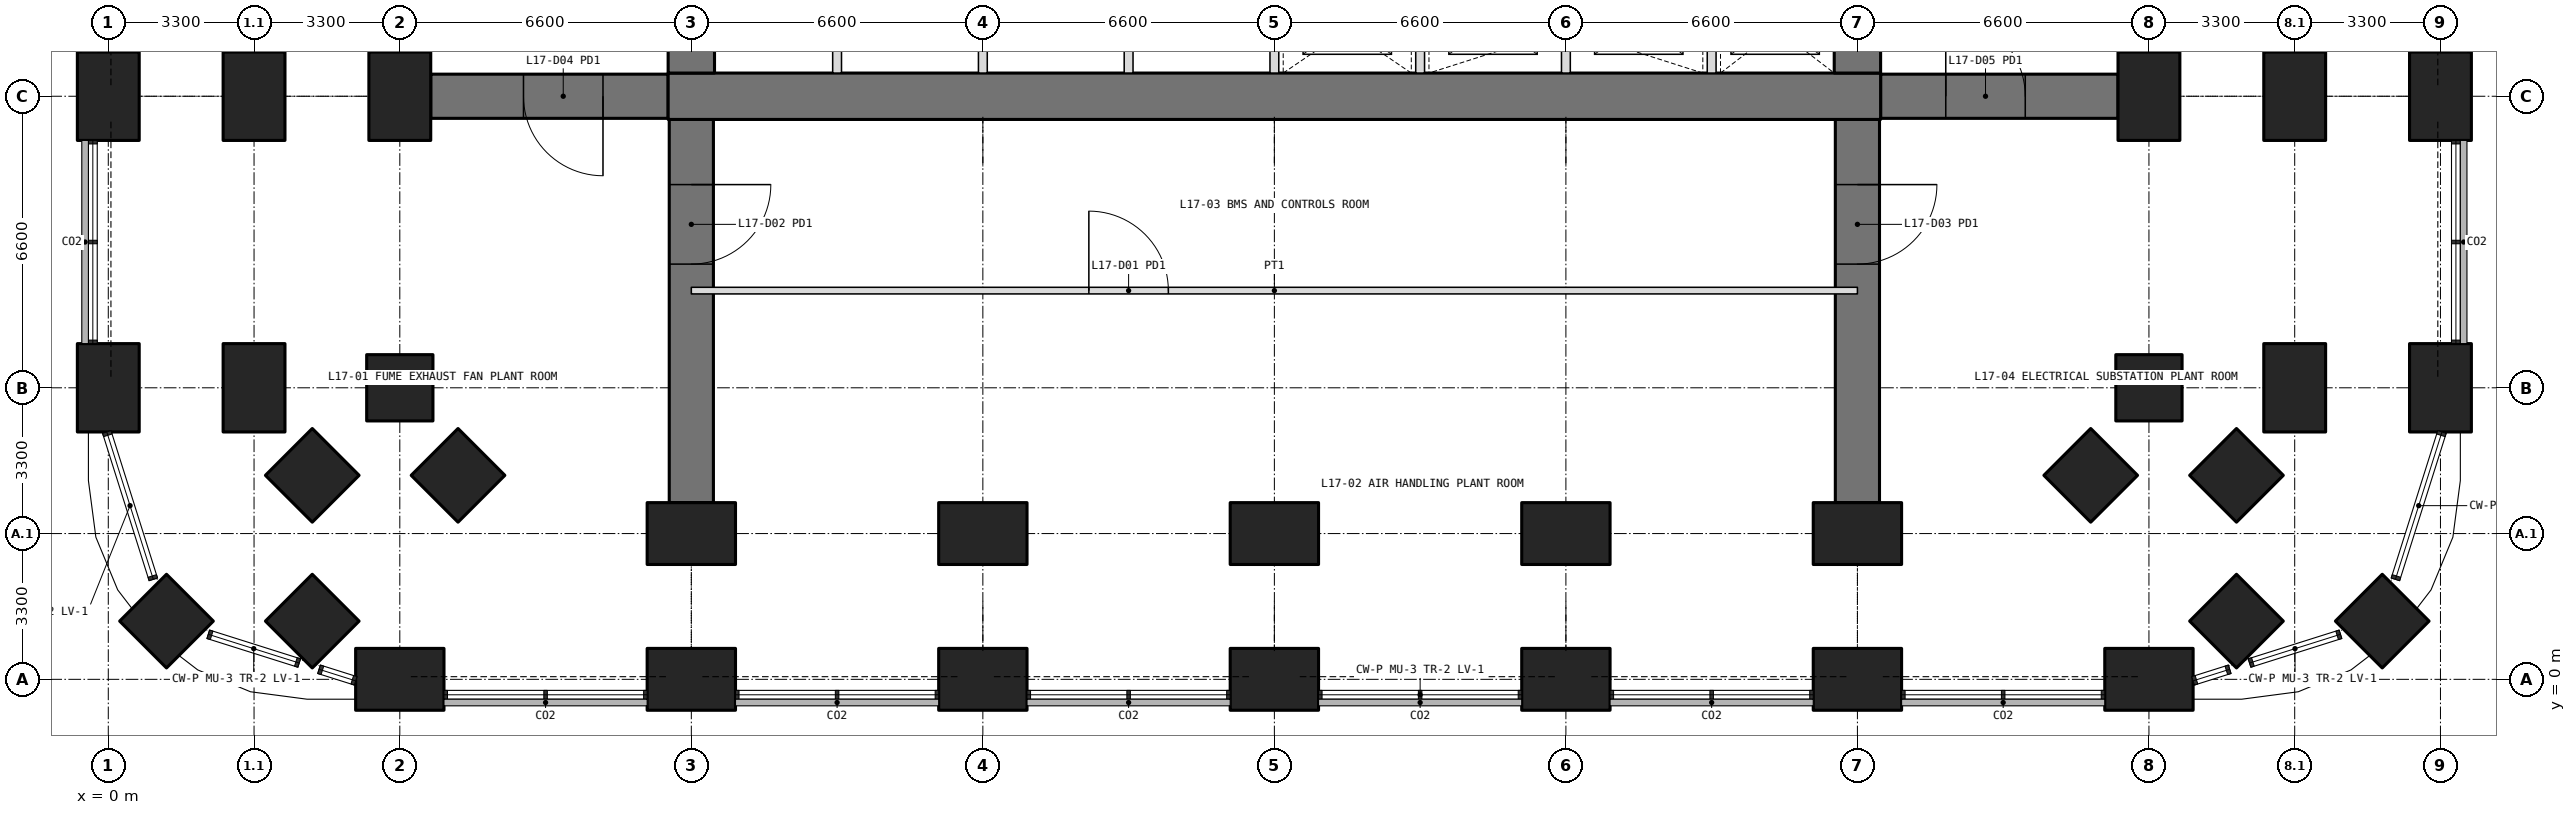
"""IFC4 building model, lengths in metres.
Left out: names, types, materials, properties, quantities, classifications, styles, units other than length and angle.
Written with IfcOpenShell. Run it as: python <this file> out.ifc"""

import sys

from ifc_helpers import new_model, si_unit, direction, frame, frame_2d, origin, origin_2d, place, context, subcontext, project, spatial, rectangle, extrude, element, fill, save


model = new_model("IFC4")
c1 = context("Model", 3, precision=1e-05, world=origin(), true_north=direction((0.0, 1.0)))
c2 = subcontext(c1, "Body", "Model", "MODEL_VIEW")
j1 = project(units=[si_unit("LENGTHUNIT", "METRE"), si_unit("PLANEANGLEUNIT", "RADIAN")], contexts=[c1])
p1 = place(None, origin())
s1 = spatial("IfcSite", under=j1, at=p1, CompositionType="ELEMENT")
p2 = place(p1, origin())
s2 = spatial("IfcBuilding", under=s1, at=p2, CompositionType="ELEMENT")
p3 = place(p2, frame((0.0, 0.0, 75.9)))
s3 = spatial("IfcBuildingStorey", under=s2, at=p3, CompositionType="ELEMENT", Elevation=75.9)
for number, where, z_axis, x_axis in (
    (1, (1.318, 1.318, 0.0), (0.0, 0.0, 1.0), (0.707, 0.707, 0.0)),
    (2, (51.482, 1.318, 0.0), (0.0, 0.0, 1.0), (0.707, 0.707, 0.0)),
):
    element("IfcColumn", number, at=place(p3, frame(where, z_axis=z_axis, x_axis=x_axis)), inside=s3, PredefinedType="COLUMN", context=c2, shape_type="SweptSolid", body=[
        extrude(rectangle(XDim=1.5, YDim=1.5, at=origin_2d()), origin(), (0.0, 0.0, 1.0), 6.3),
    ])
for number, where, z_axis, x_axis in (
    (3, (6.6, 0.0, 0.0), (0.0, 0.0, 1.0), (1.0, 0.0, 0.0)),
    (4, (13.2, 0.0, 0.0), (0.0, 0.0, 1.0), (1.0, 0.0, 0.0)),
    (5, (19.8, 0.0, 0.0), (0.0, 0.0, 1.0), (1.0, 0.0, 0.0)),
    (6, (26.4, 0.0, 0.0), (0.0, 0.0, 1.0), (1.0, 0.0, 0.0)),
    (7, (33.0, 0.0, 0.0), (0.0, 0.0, 1.0), (1.0, 0.0, 0.0)),
    (8, (39.6, 0.0, 0.0), (0.0, 0.0, 1.0), (1.0, 0.0, 0.0)),
    (9, (46.2, 0.0, 0.0), (0.0, 0.0, 1.0), (1.0, 0.0, 0.0)),
    (10, (0.0, 6.6, 0.0), (0.0, 0.0, 1.0), (0.0, 1.0, 0.0)),
    (11, (52.8, 6.6, 0.0), (0.0, 0.0, 1.0), (0.0, 1.0, 0.0)),
    (12, (0.0, 13.2, 0.0), (0.0, 0.0, 1.0), (0.0, 1.0, 0.0)),
    (13, (52.8, 13.2, 0.0), (0.0, 0.0, 1.0), (0.0, 1.0, 0.0)),
):
    element("IfcColumn", number, at=place(p3, frame(where, z_axis=z_axis, x_axis=x_axis)), inside=s3, PredefinedType="COLUMN", context=c2, shape_type="SweptSolid", body=[
        extrude(rectangle(XDim=2.0, YDim=1.4, at=origin_2d()), origin(), (0.0, 0.0, 1.0), 6.3),
    ])
for number, where, z_axis, x_axis in (
    (14, (6.6, 6.6, 0.0), (0.0, 0.0, 1.0), (1.0, 0.0, 0.0)),
    (15, (46.2, 6.6, 0.0), (0.0, 0.0, 1.0), (1.0, 0.0, 0.0)),
    (16, (4.618, 1.318, 0.0), (0.0, 0.0, 1.0), (0.707, 0.707, 0.0)),
    (17, (48.182, 1.318, 0.0), (0.0, 0.0, 1.0), (0.707, 0.707, 0.0)),
):
    element("IfcColumn", number, at=place(p3, frame(where, z_axis=z_axis, x_axis=x_axis)), inside=s3, PredefinedType="COLUMN", context=c2, shape_type="SweptSolid", body=[
        extrude(rectangle(XDim=1.5, YDim=1.5, at=origin_2d()), origin(), (0.0, 0.0, 1.0), 6.3),
    ])
for number, where, z_axis, x_axis in (
    (18, (3.3, 6.6, 0.0), (0.0, 0.0, 1.0), (0.0, 1.0, 0.0)),
    (19, (49.5, 6.6, 0.0), (0.0, 0.0, 1.0), (0.0, 1.0, 0.0)),
    (20, (3.3, 13.2, 0.0), (0.0, 0.0, 1.0), (0.0, 1.0, 0.0)),
    (21, (49.5, 13.2, 0.0), (0.0, 0.0, 1.0), (0.0, 1.0, 0.0)),
):
    element("IfcColumn", number, at=place(p3, frame(where, z_axis=z_axis, x_axis=x_axis)), inside=s3, PredefinedType="COLUMN", context=c2, shape_type="SweptSolid", body=[
        extrude(rectangle(XDim=2.0, YDim=1.4, at=origin_2d()), origin(), (0.0, 0.0, 1.0), 6.3),
    ])
for number, where, z_axis, x_axis in (
    (22, (4.618, 4.618, 0.0), (0.0, 0.0, 1.0), (0.707, 0.707, 0.0)),
    (23, (48.182, 4.618, 0.0), (0.0, 0.0, 1.0), (0.707, 0.707, 0.0)),
):
    element("IfcColumn", number, at=place(p3, frame(where, z_axis=z_axis, x_axis=x_axis)), inside=s3, PredefinedType="COLUMN", context=c2, shape_type="SweptSolid", body=[
        extrude(rectangle(XDim=1.5, YDim=1.5, at=origin_2d()), origin(), (0.0, 0.0, 1.0), 6.3),
    ])
for number, where, z_axis, x_axis in (
    (24, (13.2, 3.3, 0.0), (0.0, 0.0, 1.0), (1.0, 0.0, 0.0)),
    (25, (19.8, 3.3, 0.0), (0.0, 0.0, 1.0), (1.0, 0.0, 0.0)),
    (26, (26.4, 3.3, 0.0), (0.0, 0.0, 1.0), (1.0, 0.0, 0.0)),
    (27, (33.0, 3.3, 0.0), (0.0, 0.0, 1.0), (1.0, 0.0, 0.0)),
    (28, (39.6, 3.3, 0.0), (0.0, 0.0, 1.0), (1.0, 0.0, 0.0)),
):
    element("IfcColumn", number, at=place(p3, frame(where, z_axis=z_axis, x_axis=x_axis)), inside=s3, PredefinedType="COLUMN", context=c2, shape_type="SweptSolid", body=[
        extrude(rectangle(XDim=2.0, YDim=1.4, at=origin_2d()), origin(), (0.0, 0.0, 1.0), 6.3),
    ])
for number, where, z_axis, x_axis in (
    (29, (7.918, 4.618, 0.0), (0.0, 0.0, 1.0), (0.707, 0.707, 0.0)),
    (30, (44.882, 4.618, 0.0), (0.0, 0.0, 1.0), (0.707, 0.707, 0.0)),
):
    element("IfcColumn", number, at=place(p3, frame(where, z_axis=z_axis, x_axis=x_axis)), inside=s3, PredefinedType="COLUMN", context=c2, shape_type="SweptSolid", body=[
        extrude(rectangle(XDim=1.5, YDim=1.5, at=origin_2d()), origin(), (0.0, 0.0, 1.0), 6.3),
    ])
for number, where, z_axis, x_axis in (
    (31, (6.6, 13.2, 0.0), (0.0, 0.0, 1.0), (0.0, 1.0, 0.0)),
    (32, (46.2, 13.2, 0.0), (0.0, 0.0, 1.0), (0.0, 1.0, 0.0)),
):
    element("IfcColumn", number, at=place(p3, frame(where, z_axis=z_axis, x_axis=x_axis)), inside=s3, PredefinedType="COLUMN", context=c2, shape_type="SweptSolid", body=[
        extrude(rectangle(XDim=2.0, YDim=1.4, at=origin_2d()), origin(), (0.0, 0.0, 1.0), 6.3),
    ])
p4 = place(p3, frame((13.2, 12.675, 0.0), z_axis=(0.0, 0.0, 1.0), x_axis=(0.0, -1.0, 0.0)))
e33 = element("IfcWall", 33, at=p4, inside=s3, PredefinedType="SHEAR", context=c2, shape_type="SweptSolid", body=[
    extrude(rectangle(XDim=8.675, YDim=1.0, at=frame_2d((4.337, 0.0))), origin(), (0.0, 0.0, 1.0), 6.0),
])
p5 = place(p4, frame((1.475, 0.0, 0.0)))
e34 = element("IfcOpeningElement", 34, at=p5, cuts=e33, PredefinedType="OPENING", context=c2, shape_type="SweptSolid", body=[
    extrude(rectangle(XDim=1.8, YDim=2.4, at=frame_2d((0.9, 1.2))), frame((0.0, 0.51, 0.0), z_axis=(0.0, -1.0, 0.0), x_axis=(1.0, 0.0, 0.0)), (0.0, 0.0, 1.0), 1.02),
])
p6 = place(p3, frame((39.6, 12.675, 0.0), z_axis=(0.0, 0.0, 1.0), x_axis=(0.0, -1.0, 0.0)))
e35 = element("IfcWall", 35, at=p6, inside=s3, PredefinedType="SHEAR", context=c2, shape_type="SweptSolid", body=[
    extrude(rectangle(XDim=8.675, YDim=1.0, at=frame_2d((4.337, 0.0))), origin(), (0.0, 0.0, 1.0), 6.0),
])
p7 = place(p6, frame((1.475, 0.0, 0.0)))
e36 = element("IfcOpeningElement", 36, at=p7, cuts=e35, PredefinedType="OPENING", context=c2, shape_type="SweptSolid", body=[
    extrude(rectangle(XDim=1.8, YDim=2.4, at=frame_2d((0.9, 1.2))), frame((0.0, 0.51, 0.0), z_axis=(0.0, -1.0, 0.0), x_axis=(1.0, 0.0, 0.0)), (0.0, 0.0, 1.0), 1.02),
])
p8 = place(p3, frame((12.675, 13.2, 0.0), z_axis=(0.0, 0.0, 1.0), x_axis=(-1.0, 0.0, 0.0)))
e37 = element("IfcWall", 37, at=p8, inside=s3, PredefinedType="SHEAR", context=c2, shape_type="SweptSolid", body=[
    extrude(rectangle(XDim=5.375, YDim=1.0, at=frame_2d((2.688, 0.0))), origin(), (0.0, 0.0, 1.0), 6.0),
])
p9 = place(p8, frame((1.475, 0.0, 0.0)))
e38 = element("IfcOpeningElement", 38, at=p9, cuts=e37, PredefinedType="OPENING", context=c2, shape_type="SweptSolid", body=[
    extrude(rectangle(XDim=1.8, YDim=2.4, at=frame_2d((0.9, 1.2))), frame((0.0, 0.51, 0.0), z_axis=(0.0, -1.0, 0.0), x_axis=(1.0, 0.0, 0.0)), (0.0, 0.0, 1.0), 1.02),
])
p10 = place(p3, frame((40.125, 13.2, 0.0), z_axis=(0.0, 0.0, 1.0), x_axis=(1.0, 0.0, 0.0)))
e39 = element("IfcWall", 39, at=p10, inside=s3, PredefinedType="SHEAR", context=c2, shape_type="SweptSolid", body=[
    extrude(rectangle(XDim=5.375, YDim=1.0, at=frame_2d((2.688, 0.0))), origin(), (0.0, 0.0, 1.0), 6.0),
])
p11 = place(p10, frame((1.475, 0.0, 0.0)))
e40 = element("IfcOpeningElement", 40, at=p11, cuts=e39, PredefinedType="OPENING", context=c2, shape_type="SweptSolid", body=[
    extrude(rectangle(XDim=1.8, YDim=2.4, at=frame_2d((0.9, 1.2))), frame((0.0, 0.51, 0.0), z_axis=(0.0, -1.0, 0.0), x_axis=(1.0, 0.0, 0.0)), (0.0, 0.0, 1.0), 1.02),
])
p12 = place(p3, frame((12.675, 13.2, 0.0), z_axis=(0.0, 0.0, 1.0), x_axis=(1.0, 0.0, 0.0)))
e41 = element("IfcWall", 41, at=p12, inside=s3, PredefinedType="SHEAR", context=c2, shape_type="SweptSolid", body=[
    extrude(rectangle(XDim=27.45, YDim=1.05, at=frame_2d((13.725, 0.0))), origin(), (0.0, 0.0, 1.0), 6.3),
])
p13 = place(p3, frame((39.6, 13.725, 0.0), z_axis=(0.0, 0.0, 1.0), x_axis=(0.0, 1.0, 0.0)))
e42 = element("IfcWall", 42, at=p13, inside=s3, PredefinedType="SHEAR", context=c2, shape_type="SweptSolid", body=[
    extrude(rectangle(XDim=18.75, YDim=1.05, at=frame_2d((9.375, 0.0))), origin(), (0.0, 0.0, 1.0), 6.3),
])
p14 = place(p13, frame((3.025, 0.0, 0.0)))
e43 = element("IfcOpeningElement", 43, at=p14, cuts=e42, PredefinedType="OPENING", context=c2, shape_type="SweptSolid", body=[
    extrude(rectangle(XDim=1.6, YDim=2.1, at=frame_2d((0.8, 1.05))), frame((0.0, 0.535, 0.0), z_axis=(0.0, -1.0, 0.0), x_axis=(1.0, 0.0, 0.0)), (0.0, 0.0, 1.0), 1.07),
])
p15 = place(p13, frame((13.825, 0.0, 0.0)))
e44 = element("IfcOpeningElement", 44, at=p15, cuts=e42, PredefinedType="OPENING", context=c2, shape_type="SweptSolid", body=[
    extrude(rectangle(XDim=1.6, YDim=2.1, at=frame_2d((0.8, 1.05))), frame((0.0, 0.535, 0.0), z_axis=(0.0, -1.0, 0.0), x_axis=(1.0, 0.0, 0.0)), (0.0, 0.0, 1.0), 1.07),
])
p16 = place(p3, frame((13.2, 32.475, 0.0), z_axis=(0.0, 0.0, 1.0), x_axis=(0.0, -1.0, 0.0)))
e45 = element("IfcWall", 45, at=p16, inside=s3, PredefinedType="SHEAR", context=c2, shape_type="SweptSolid", body=[
    extrude(rectangle(XDim=18.75, YDim=1.05, at=frame_2d((9.375, 0.0))), origin(), (0.0, 0.0, 1.0), 6.3),
])
p17 = place(p16, frame((14.125, 0.0, 0.0)))
e46 = element("IfcOpeningElement", 46, at=p17, cuts=e45, PredefinedType="OPENING", context=c2, shape_type="SweptSolid", body=[
    extrude(rectangle(XDim=1.6, YDim=2.1, at=frame_2d((0.8, 1.05))), frame((0.0, 0.535, 0.0), z_axis=(0.0, -1.0, 0.0), x_axis=(1.0, 0.0, 0.0)), (0.0, 0.0, 1.0), 1.07),
])
p18 = place(p16, frame((3.325, 0.0, 0.0)))
e47 = element("IfcOpeningElement", 47, at=p18, cuts=e45, PredefinedType="OPENING", context=c2, shape_type="SweptSolid", body=[
    extrude(rectangle(XDim=1.6, YDim=2.1, at=frame_2d((0.8, 1.05))), frame((0.0, 0.535, 0.0), z_axis=(0.0, -1.0, 0.0), x_axis=(1.0, 0.0, 0.0)), (0.0, 0.0, 1.0), 1.07),
])
for number, where, z_axis, x_axis in (
    (48, (16.5, 13.725, 0.0), (0.0, 0.0, 1.0), (0.0, 1.0, 0.0)),
    (49, (19.8, 13.725, 0.0), (0.0, 0.0, 1.0), (0.0, 1.0, 0.0)),
    (50, (23.1, 13.725, 0.0), (0.0, 0.0, 1.0), (0.0, 1.0, 0.0)),
    (51, (26.4, 13.725, 0.0), (0.0, 0.0, 1.0), (0.0, 1.0, 0.0)),
    (52, (29.7, 13.725, 0.0), (0.0, 0.0, 1.0), (0.0, 1.0, 0.0)),
    (53, (33.0, 13.725, 0.0), (0.0, 0.0, 1.0), (0.0, 1.0, 0.0)),
    (54, (36.3, 13.725, 0.0), (0.0, 0.0, 1.0), (0.0, 1.0, 0.0)),
):
    element("IfcWall", number, at=place(p3, frame(where, z_axis=z_axis, x_axis=x_axis)), inside=s3, PredefinedType="PARTITIONING", context=c2, shape_type="SweptSolid", body=[
        extrude(rectangle(XDim=1.975, YDim=0.2, at=frame_2d((0.987, 0.0))), origin(), (0.0, 0.0, 1.0), 6.3),
    ])
p19 = place(p3, frame((13.2, 8.8, 0.0), z_axis=(0.0, 0.0, 1.0), x_axis=(1.0, 0.0, 0.0)))
e55 = element("IfcWall", 55, at=p19, inside=s3, PredefinedType="PARTITIONING", context=c2, shape_type="SweptSolid", body=[
    extrude(rectangle(XDim=26.4, YDim=0.15, at=frame_2d((13.2, 0.0))), origin(), (0.0, 0.0, 1.0), 4.0),
])
p20 = place(p19, frame((9.0, 0.0, 0.0)))
e56 = element("IfcOpeningElement", 56, at=p20, cuts=e55, PredefinedType="OPENING", context=c2, shape_type="SweptSolid", body=[
    extrude(rectangle(XDim=1.8, YDim=2.4, at=frame_2d((0.9, 1.2))), frame((0.0, 0.085, 0.0), z_axis=(0.0, -1.0, 0.0), x_axis=(1.0, 0.0, 0.0)), (0.0, 0.0, 1.0), 0.17),
])
p21 = place(p20, origin())
e57 = element("IfcDoor", 57, at=p21, inside=s3, OperationType="DOUBLE_DOOR_SINGLE_SWING", PredefinedType="DOOR", context=c2, shape_type="SweptSolid", body=[
    extrude(rectangle(XDim=1.8, YDim=2.4, at=frame_2d((0.9, 1.2))), frame((0.0, 0.025, 0.0), z_axis=(0.0, -1.0, 0.0), x_axis=(1.0, 0.0, 0.0)), (0.0, 0.0, 1.0), 0.05),
])
fill(e56, e57)
p22 = place(p5, origin())
e58 = element("IfcDoor", 58, at=p22, inside=s3, OperationType="DOUBLE_DOOR_SINGLE_SWING", PredefinedType="DOOR", context=c2, shape_type="SweptSolid", body=[
    extrude(rectangle(XDim=1.8, YDim=2.4, at=frame_2d((0.9, 1.2))), frame((0.0, 0.025, 0.0), z_axis=(0.0, -1.0, 0.0), x_axis=(1.0, 0.0, 0.0)), (0.0, 0.0, 1.0), 0.05),
])
fill(e34, e58)
p23 = place(p7, origin())
e59 = element("IfcDoor", 59, at=p23, inside=s3, OperationType="DOUBLE_DOOR_SINGLE_SWING", PredefinedType="DOOR", context=c2, shape_type="SweptSolid", body=[
    extrude(rectangle(XDim=1.8, YDim=2.4, at=frame_2d((0.9, 1.2))), frame((0.0, 0.025, 0.0), z_axis=(0.0, -1.0, 0.0), x_axis=(1.0, 0.0, 0.0)), (0.0, 0.0, 1.0), 0.05),
])
fill(e36, e59)
p24 = place(p9, origin())
e60 = element("IfcDoor", 60, at=p24, inside=s3, OperationType="DOUBLE_DOOR_SINGLE_SWING", PredefinedType="DOOR", context=c2, shape_type="SweptSolid", body=[
    extrude(rectangle(XDim=1.8, YDim=2.4, at=frame_2d((0.9, 1.2))), frame((0.0, 0.025, 0.0), z_axis=(0.0, -1.0, 0.0), x_axis=(1.0, 0.0, 0.0)), (0.0, 0.0, 1.0), 0.05),
])
fill(e38, e60)
p25 = place(p11, origin())
e61 = element("IfcDoor", 61, at=p25, inside=s3, OperationType="DOUBLE_DOOR_SINGLE_SWING", PredefinedType="DOOR", context=c2, shape_type="SweptSolid", body=[
    extrude(rectangle(XDim=1.8, YDim=2.4, at=frame_2d((0.9, 1.2))), frame((0.0, 0.025, 0.0), z_axis=(0.0, -1.0, 0.0), x_axis=(1.0, 0.0, 0.0)), (0.0, 0.0, 1.0), 0.05),
])
fill(e40, e61)
save(model, sys.argv[1])
